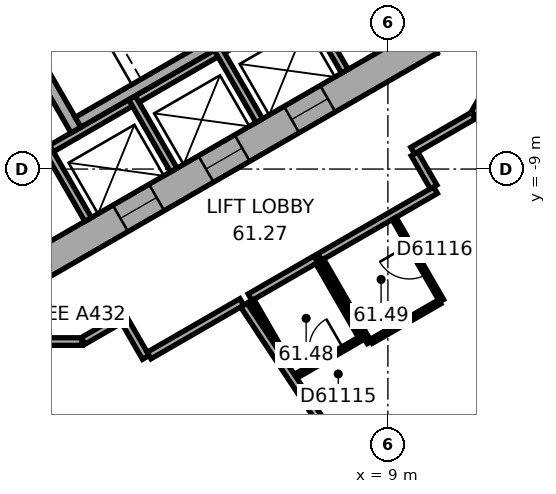
"""IFC4 building model, lengths in metres.
Left out: names, types, materials, properties, quantities, classifications, styles, units other than length and angle.
Written with IfcOpenShell. Run it as: python <this file> out.ifc"""

import sys

from ifc_helpers import new_model, si_unit, direction, frame, frame_2d, origin, place, context, subcontext, project, spatial, rectangle, extrude, element, fill, save


model = new_model("IFC4")
c1 = context("Model", 3, precision=1e-05, world=origin(), true_north=direction((0.0, 1.0)))
c2 = subcontext(c1, "Body", "Model", "MODEL_VIEW")
j1 = project(units=[si_unit("LENGTHUNIT", "METRE"), si_unit("PLANEANGLEUNIT", "RADIAN")], contexts=[c1])
p1 = place(None, origin())
s1 = spatial("IfcSite", under=j1, at=p1, CompositionType="ELEMENT")
p2 = place(p1, origin())
s2 = spatial("IfcBuilding", under=s1, at=p2, CompositionType="ELEMENT")
p3 = place(p2, frame((0.0, 0.0, 247.6)))
s3 = spatial("IfcBuildingStorey", under=s2, at=p3, CompositionType="ELEMENT", Elevation=247.6)
p4 = place(p3, frame((9.9, -5.947, 0.0), z_axis=(0.0, 0.0, 1.0), x_axis=(0.0, 1.0, 0.0)))
e1 = element("IfcWall", 1, at=p4, inside=s3, PredefinedType="SHEAR", context=c2, shape_type="SweptSolid", body=[
    extrude(rectangle(XDim=11.894, YDim=0.8, at=frame_2d((5.947, 0.0))), origin(), (0.0, 0.0, 1.0), 3.7),
])
p5 = place(p4, frame((6.147, 0.0, 0.0)))
e2 = element("IfcOpeningElement", 2, at=p5, cuts=e1, PredefinedType="OPENING", context=c2, shape_type="SweptSolid", body=[
    extrude(rectangle(XDim=1.5, YDim=2.1, at=frame_2d((0.75, 1.05))), frame((0.0, 0.41, 0.0), z_axis=(0.0, -1.0, 0.0), x_axis=(1.0, 0.0, 0.0)), (0.0, 0.0, 1.0), 0.82),
])
p6 = place(p4, frame((1.697, 0.0, 0.0)))
e3 = element("IfcOpeningElement", 3, at=p6, cuts=e1, PredefinedType="OPENING", context=c2, shape_type="SweptSolid", body=[
    extrude(rectangle(XDim=0.9, YDim=2.1, at=frame_2d((0.45, 1.05))), frame((0.0, 0.41, 0.0), z_axis=(0.0, -1.0, 0.0), x_axis=(1.0, 0.0, 0.0)), (0.0, 0.0, 1.0), 0.82),
])
p7 = place(p4, frame((4.297, 0.0, 0.0)))
e4 = element("IfcOpeningElement", 4, at=p7, cuts=e1, PredefinedType="OPENING", context=c2, shape_type="SweptSolid", body=[
    extrude(rectangle(XDim=0.9, YDim=2.1, at=frame_2d((0.45, 1.05))), frame((0.0, 0.41, 0.0), z_axis=(0.0, -1.0, 0.0), x_axis=(1.0, 0.0, 0.0)), (0.0, 0.0, 1.0), 0.82),
])
p8 = place(p3, frame((-10.1, -5.6, 0.0), z_axis=(0.0, 0.0, 1.0), x_axis=(0.866023897231, -0.500002609418, 0.0)))
e5 = element("IfcWall", 5, at=p8, inside=s3, PredefinedType="SHEAR", context=c2, shape_type="SweptSolid", body=[
    extrude(rectangle(XDim=11.894, YDim=0.8, at=frame_2d((5.947, 0.0))), origin(), (0.0, 0.0, 1.0), 3.7),
])
p9 = place(p8, frame((6.147, 0.0, 0.0)))
e6 = element("IfcOpeningElement", 6, at=p9, cuts=e5, PredefinedType="OPENING", context=c2, shape_type="SweptSolid", body=[
    extrude(rectangle(XDim=1.5, YDim=2.1, at=frame_2d((0.75, 1.05))), frame((0.0, 0.41, 0.0), z_axis=(0.0, -1.0, 0.0), x_axis=(1.0, 0.0, 0.0)), (0.0, 0.0, 1.0), 0.82),
])
p10 = place(p8, frame((1.597, 0.0, 0.0)))
e7 = element("IfcOpeningElement", 7, at=p10, cuts=e5, PredefinedType="OPENING", context=c2, shape_type="SweptSolid", body=[
    extrude(rectangle(XDim=1.1, YDim=2.1, at=frame_2d((0.55, 1.05))), frame((0.0, 0.41, 0.0), z_axis=(0.0, -1.0, 0.0), x_axis=(1.0, 0.0, 0.0)), (0.0, 0.0, 1.0), 0.82),
])
p11 = place(p8, frame((4.197, 0.0, 0.0)))
e8 = element("IfcOpeningElement", 8, at=p11, cuts=e5, PredefinedType="OPENING", context=c2, shape_type="SweptSolid", body=[
    extrude(rectangle(XDim=1.1, YDim=2.1, at=frame_2d((0.55, 1.05))), frame((0.0, 0.41, 0.0), z_axis=(0.0, -1.0, 0.0), x_axis=(1.0, 0.0, 0.0)), (0.0, 0.0, 1.0), 0.82),
])
p12 = place(p3, frame((-0.2, -11.547, 0.0), z_axis=(0.0, 0.0, 1.0), x_axis=(0.866023897231, 0.500002609418, 0.0)))
e9 = element("IfcWall", 9, at=p12, inside=s3, PredefinedType="SHEAR", context=c2, shape_type="SweptSolid", body=[
    extrude(rectangle(XDim=11.894, YDim=0.8, at=frame_2d((5.947, 0.0))), origin(), (0.0, 0.0, 1.0), 3.7),
])
p13 = place(p12, frame((2.497, 0.0, 0.0)))
e10 = element("IfcOpeningElement", 10, at=p13, cuts=e9, PredefinedType="OPENING", context=c2, shape_type="SweptSolid", body=[
    extrude(rectangle(XDim=1.1, YDim=2.1, at=frame_2d((0.55, 1.05))), frame((0.0, 0.41, 0.0), z_axis=(0.0, -1.0, 0.0), x_axis=(1.0, 0.0, 0.0)), (0.0, 0.0, 1.0), 0.82),
])
p14 = place(p12, frame((5.097, 0.0, 0.0)))
e11 = element("IfcOpeningElement", 11, at=p14, cuts=e9, PredefinedType="OPENING", context=c2, shape_type="SweptSolid", body=[
    extrude(rectangle(XDim=1.1, YDim=2.1, at=frame_2d((0.55, 1.05))), frame((0.0, 0.41, 0.0), z_axis=(0.0, -1.0, 0.0), x_axis=(1.0, 0.0, 0.0)), (0.0, 0.0, 1.0), 0.82),
])
p15 = place(p12, frame((7.697, 0.0, 0.0)))
e12 = element("IfcOpeningElement", 12, at=p15, cuts=e9, PredefinedType="OPENING", context=c2, shape_type="SweptSolid", body=[
    extrude(rectangle(XDim=1.1, YDim=2.1, at=frame_2d((0.55, 1.05))), frame((0.0, 0.41, 0.0), z_axis=(0.0, -1.0, 0.0), x_axis=(1.0, 0.0, 0.0)), (0.0, 0.0, 1.0), 0.82),
])
p16 = place(p3, frame((2.739, -22.711, 0.0), z_axis=(0.0, 0.0, 1.0), x_axis=(0.833885723098, 0.551937134838, 0.0)))
e13 = element("IfcWall", 13, at=p16, inside=s3, PredefinedType="STANDARD", context=c2, shape_type="SweptSolid", body=[
    extrude(rectangle(XDim=18.841, YDim=0.2, at=frame_2d((9.421, 0.0))), origin(), (0.0, 0.0, 1.0), 3.7),
])
p17 = place(p16, frame((1.252, 0.0, 0.9)))
e14 = element("IfcOpeningElement", 14, at=p17, cuts=e13, PredefinedType="OPENING", context=c2, shape_type="SweptSolid", body=[
    extrude(rectangle(XDim=2.2, YDim=2.0, at=frame_2d((1.1, 1.0))), frame((0.0, 0.11, 0.0), z_axis=(0.0, -1.0, 0.0), x_axis=(1.0, 0.0, 0.0)), (0.0, 0.0, 1.0), 0.22),
])
p18 = place(p16, frame((4.786, 0.0, 0.9)))
e15 = element("IfcOpeningElement", 15, at=p18, cuts=e13, PredefinedType="OPENING", context=c2, shape_type="SweptSolid", body=[
    extrude(rectangle(XDim=2.2, YDim=2.0, at=frame_2d((1.1, 1.0))), frame((0.0, 0.11, 0.0), z_axis=(0.0, -1.0, 0.0), x_axis=(1.0, 0.0, 0.0)), (0.0, 0.0, 1.0), 0.22),
])
p19 = place(p16, frame((8.32, 0.0, 0.9)))
e16 = element("IfcOpeningElement", 16, at=p19, cuts=e13, PredefinedType="OPENING", context=c2, shape_type="SweptSolid", body=[
    extrude(rectangle(XDim=2.2, YDim=2.0, at=frame_2d((1.1, 1.0))), frame((0.0, 0.11, 0.0), z_axis=(0.0, -1.0, 0.0), x_axis=(1.0, 0.0, 0.0)), (0.0, 0.0, 1.0), 0.22),
])
p20 = place(p16, frame((11.854, 0.0, 0.9)))
e17 = element("IfcOpeningElement", 17, at=p20, cuts=e13, PredefinedType="OPENING", context=c2, shape_type="SweptSolid", body=[
    extrude(rectangle(XDim=2.2, YDim=2.0, at=frame_2d((1.1, 1.0))), frame((0.0, 0.11, 0.0), z_axis=(0.0, -1.0, 0.0), x_axis=(1.0, 0.0, 0.0)), (0.0, 0.0, 1.0), 0.22),
])
p21 = place(p16, frame((15.387, 0.0, 0.9)))
e18 = element("IfcOpeningElement", 18, at=p21, cuts=e13, PredefinedType="OPENING", context=c2, shape_type="SweptSolid", body=[
    extrude(rectangle(XDim=2.2, YDim=2.0, at=frame_2d((1.1, 1.0))), frame((0.0, 0.11, 0.0), z_axis=(0.0, -1.0, 0.0), x_axis=(1.0, 0.0, 0.0)), (0.0, 0.0, 1.0), 0.22),
])
p22 = place(p3, frame((-0.024, -8.559, 0.0), z_axis=(0.0, 0.0, 1.0), x_axis=(0.866026010844, 0.49999894854, 0.0)))
e19 = element("IfcWall", 19, at=p22, inside=s3, PredefinedType="PARTITIONING", context=c2, shape_type="SweptSolid", body=[
    extrude(rectangle(XDim=8.0, YDim=0.2, at=frame_2d((4.0, 0.0))), origin(), (0.0, 0.0, 1.0), 3.42),
])
for number, where, z_axis, x_axis in (
    (20, (0.013, -8.422, 0.0), (0.0, 0.0, 1.0), (0.5, -0.866, 0.0)),
    (21, (2.264, -7.122, 0.0), (0.0, 0.0, 1.0), (0.5, -0.866, 0.0)),
    (22, (4.516, -5.822, 0.0), (0.0, 0.0, 1.0), (0.5, -0.866, 0.0)),
    (23, (6.768, -4.522, 0.0), (0.0, 0.0, 1.0), (0.5, -0.866, 0.0)),
):
    element("IfcWall", number, at=place(p3, frame(where, z_axis=z_axis, x_axis=x_axis)), inside=s3, PredefinedType="PARTITIONING", context=c2, shape_type="SweptSolid", body=[
        extrude(rectangle(XDim=2.2, YDim=0.2, at=frame_2d((1.1, 0.0))), origin(), (0.0, 0.0, 1.0), 3.42),
    ])
p23 = place(p3, frame((-1.558, -3.902, 0.0), z_axis=(0.0, 0.0, 1.0), x_axis=(0.499977259774, -0.866038532462, 0.0)))
e24 = element("IfcWall", 24, at=p23, inside=s3, PredefinedType="SHEAR", context=c2, shape_type="SweptSolid", body=[
    extrude(rectangle(XDim=4.7, YDim=0.3, at=frame_2d((2.35, 0.0))), origin(), (0.0, 0.0, 1.0), 3.42),
])
p24 = place(p23, frame((0.8, 0.0, 0.0)))
e25 = element("IfcOpeningElement", 25, at=p24, cuts=e24, PredefinedType="OPENING", context=c2, shape_type="SweptSolid", body=[
    extrude(rectangle(XDim=1.2, YDim=2.1, at=frame_2d((0.6, 1.05))), frame((0.0, 0.16, 0.0), z_axis=(0.0, -1.0, 0.0), x_axis=(1.0, 0.0, 0.0)), (0.0, 0.0, 1.0), 0.32),
])
p25 = place(p3, frame((0.847, -7.767, 0.0), z_axis=(0.0, 0.0, 1.0), x_axis=(0.866027801685, 0.499995846692, 0.0)))
e26 = element("IfcWall", 26, at=p25, inside=s3, PredefinedType="SHEAR", context=c2, shape_type="SweptSolid", body=[
    extrude(rectangle(XDim=7.06, YDim=0.3, at=frame_2d((3.53, 0.0))), origin(), (0.0, 0.0, 1.0), 3.42),
])
p26 = place(p3, frame((-0.91, -13.539, 0.0), z_axis=(0.0, 0.0, 1.0), x_axis=(1.0, 0.0, 0.0)))
e27 = element("IfcWall", 27, at=p26, inside=s3, PredefinedType="PARTITIONING", context=c2, shape_type="SweptSolid", body=[
    extrude(rectangle(XDim=1.86, YDim=0.2, at=frame_2d((0.93, 0.0))), origin(), (0.0, 0.0, 1.0), 3.42),
])
p27 = place(p3, frame((0.985, -13.519, 0.0), z_axis=(0.0, 0.0, 1.0), x_axis=(0.866054082991, 0.499950322867, 0.0)))
e28 = element("IfcWall", 28, at=p27, inside=s3, PredefinedType="PARTITIONING", context=c2, shape_type="SweptSolid", body=[
    extrude(rectangle(XDim=1.206, YDim=0.2, at=frame_2d((0.603, 0.0))), origin(), (0.0, 0.0, 1.0), 3.42),
])
p28 = place(p3, frame((2.079, -13.003, 0.0), z_axis=(0.0, 0.0, 1.0), x_axis=(0.500074377092, -0.865982457891, 0.0)))
e29 = element("IfcWall", 29, at=p28, inside=s3, PredefinedType="PARTITIONING", context=c2, shape_type="SweptSolid", body=[
    extrude(rectangle(XDim=1.101, YDim=0.2, at=frame_2d((0.55, 0.0))), origin(), (0.0, 0.0, 1.0), 3.42),
])
p29 = place(p3, frame((2.716, -13.906, 0.0), z_axis=(0.0, 0.0, 1.0), x_axis=(0.866048512801, 0.499959971872, 0.0)))
e30 = element("IfcWall", 30, at=p29, inside=s3, PredefinedType="PARTITIONING", context=c2, shape_type="SweptSolid", body=[
    extrude(rectangle(XDim=2.818, YDim=0.2, at=frame_2d((1.409, 0.0))), origin(), (0.0, 0.0, 1.0), 3.42),
])
p30 = place(p3, frame((5.373, -12.372, 0.0), z_axis=(0.0, 0.0, 1.0), x_axis=(0.866010750942, 0.50002537861, 0.0)))
e31 = element("IfcWall", 31, at=p30, inside=s3, PredefinedType="PARTITIONING", context=c2, shape_type="SweptSolid", body=[
    extrude(rectangle(XDim=2.0, YDim=0.2, at=frame_2d((1.0, 0.0))), origin(), (0.0, 0.0, 1.0), 3.42),
])
p31 = place(p3, frame((6.107, -13.644, 0.0), z_axis=(0.0, 0.0, 1.0), x_axis=(-0.500072492706, 0.865983546056, 0.0)))
e32 = element("IfcWall", 32, at=p31, inside=s3, PredefinedType="PARTITIONING", context=c2, shape_type="SweptSolid", body=[
    extrude(rectangle(XDim=1.368, YDim=0.12, at=frame_2d((0.684, 0.0))), origin(), (0.0, 0.0, 1.0), 3.42),
])
p32 = place(p3, frame((7.155, -11.459, 0.0), z_axis=(0.0, 0.0, 1.0), x_axis=(0.500077740698, -0.865980515519, 0.0)))
e33 = element("IfcWall", 33, at=p32, inside=s3, PredefinedType="PARTITIONING", context=c2, shape_type="SweptSolid", body=[
    extrude(rectangle(XDim=2.3, YDim=0.12, at=frame_2d((1.15, 0.0))), origin(), (0.0, 0.0, 1.0), 3.42),
])
p33 = place(p3, frame((7.208, -11.312, 0.0), z_axis=(0.0, 0.0, 1.0), x_axis=(0.866050243185, 0.499956974429, 0.0)))
e34 = element("IfcWall", 34, at=p33, inside=s3, PredefinedType="PARTITIONING", context=c2, shape_type="SweptSolid", body=[
    extrude(rectangle(XDim=3.514, YDim=0.2, at=frame_2d((1.757, 0.0))), origin(), (0.0, 0.0, 1.0), 3.42),
])
p34 = place(p3, frame((8.253, -13.481, 0.0), z_axis=(0.0, 0.0, 1.0), x_axis=(-0.866045024864, -0.499966013754, 0.0)))
e35 = element("IfcWall", 35, at=p34, inside=s3, PredefinedType="PARTITIONING", context=c2, shape_type="SweptSolid", body=[
    extrude(rectangle(XDim=1.88, YDim=0.12, at=frame_2d((0.94, 0.0))), origin(), (0.0, 0.0, 1.0), 3.42),
])
p35 = place(p34, frame((0.49, 0.0, 0.0)))
e36 = element("IfcOpeningElement", 36, at=p35, cuts=e35, PredefinedType="OPENING", context=c2, shape_type="SweptSolid", body=[
    extrude(rectangle(XDim=0.9, YDim=2.1, at=frame_2d((0.45, 1.05))), frame((0.0, 0.07, 0.0), z_axis=(0.0, -1.0, 0.0), x_axis=(1.0, 0.0, 0.0)), (0.0, 0.0, 1.0), 0.14),
])
p36 = place(p3, frame((8.509, -13.564, 0.0), z_axis=(0.0, 0.0, 1.0), x_axis=(-0.500004234368, 0.866022959057, 0.0)))
e37 = element("IfcWall", 37, at=p36, inside=s3, PredefinedType="PARTITIONING", context=c2, shape_type="SweptSolid", body=[
    extrude(rectangle(XDim=2.5, YDim=0.12, at=frame_2d((1.25, 0.0))), origin(), (0.0, 0.0, 1.0), 3.42),
])
p37 = place(p3, frame((8.624, -17.737, 0.0), z_axis=(0.0, 0.0, 1.0), x_axis=(-0.551945242328, 0.833880356809, 0.0)))
e38 = element("IfcWall", 38, at=p37, inside=s3, PredefinedType="PARTITIONING", context=c2, shape_type="SweptSolid", body=[
    extrude(rectangle(XDim=6.183, YDim=0.2, at=frame_2d((3.091, 0.0))), origin(), (0.0, 0.0, 1.0), 2.87),
])
p38 = place(p3, frame((9.164, -10.299, 0.0), z_axis=(0.0, 0.0, 1.0), x_axis=(0.500004234368, -0.866022959057, 0.0)))
e39 = element("IfcWall", 39, at=p38, inside=s3, PredefinedType="PARTITIONING", context=c2, shape_type="SweptSolid", body=[
    extrude(rectangle(XDim=2.5, YDim=0.12, at=frame_2d((1.25, 0.0))), origin(), (0.0, 0.0, 1.0), 3.42),
])
p39 = place(p38, frame((0.8, 0.0, 0.0)))
e40 = element("IfcOpeningElement", 40, at=p39, cuts=e39, PredefinedType="OPENING", context=c2, shape_type="SweptSolid", body=[
    extrude(rectangle(XDim=0.9, YDim=2.1, at=frame_2d((0.45, 1.05))), frame((0.0, 0.07, 0.0), z_axis=(0.0, -1.0, 0.0), x_axis=(1.0, 0.0, 0.0)), (0.0, 0.0, 1.0), 0.14),
])
p40 = place(p3, frame((9.652, -8.515, 0.0), z_axis=(0.0, 0.0, 1.0), x_axis=(0.866020375458, 0.500008709215, 0.0)))
e41 = element("IfcWall", 41, at=p40, inside=s3, PredefinedType="PARTITIONING", context=c2, shape_type="SweptSolid", body=[
    extrude(rectangle(XDim=1.846, YDim=0.2, at=frame_2d((0.923, 0.0))), origin(), (0.0, 0.0, 1.0), 3.42),
])
p41 = place(p3, frame((10.202, -9.469, 0.0), z_axis=(0.0, 0.0, 1.0), x_axis=(-0.499968756647, 0.866043441391, 0.0)))
e42 = element("IfcWall", 42, at=p41, inside=s3, PredefinedType="PARTITIONING", context=c2, shape_type="SweptSolid", body=[
    extrude(rectangle(XDim=1.001, YDim=0.2, at=frame_2d((0.5, 0.0))), origin(), (0.0, 0.0, 1.0), 3.42),
])
p42 = place(p3, frame((10.362, -12.494, 0.0), z_axis=(0.0, 0.0, 1.0), x_axis=(-0.866009661879, -0.500027264788, 0.0)))
e43 = element("IfcWall", 43, at=p42, inside=s3, PredefinedType="PARTITIONING", context=c2, shape_type="SweptSolid", body=[
    extrude(rectangle(XDim=2.08, YDim=0.12, at=frame_2d((1.04, 0.0))), origin(), (0.0, 0.0, 1.0), 3.42),
])
p43 = place(p3, frame((11.27, -7.558, 0.0), z_axis=(0.0, 0.0, 1.0), x_axis=(0.499964847546, 0.866045698112, 0.0)))
e44 = element("IfcWall", 44, at=p43, inside=s3, PredefinedType="PARTITIONING", context=c2, shape_type="SweptSolid", body=[
    extrude(rectangle(XDim=1.86, YDim=0.2, at=frame_2d((0.93, 0.0))), origin(), (0.0, 0.0, 1.0), 3.42),
])
p44 = place(p13, origin())
e45 = element("IfcDoor", 45, at=p44, inside=s3, OperationType="DOUBLE_DOOR_SLIDING", PredefinedType="DOOR", context=c2, shape_type="SweptSolid", body=[
    extrude(rectangle(XDim=1.1, YDim=2.1, at=frame_2d((0.55, 1.05))), frame((0.0, 0.025, 0.0), z_axis=(0.0, -1.0, 0.0), x_axis=(1.0, 0.0, 0.0)), (0.0, 0.0, 1.0), 0.05),
])
fill(e10, e45)
p45 = place(p14, origin())
e46 = element("IfcDoor", 46, at=p45, inside=s3, OperationType="DOUBLE_DOOR_SLIDING", PredefinedType="DOOR", context=c2, shape_type="SweptSolid", body=[
    extrude(rectangle(XDim=1.1, YDim=2.1, at=frame_2d((0.55, 1.05))), frame((0.0, 0.025, 0.0), z_axis=(0.0, -1.0, 0.0), x_axis=(1.0, 0.0, 0.0)), (0.0, 0.0, 1.0), 0.05),
])
fill(e11, e46)
p46 = place(p15, origin())
e47 = element("IfcDoor", 47, at=p46, inside=s3, OperationType="DOUBLE_DOOR_SLIDING", PredefinedType="DOOR", context=c2, shape_type="SweptSolid", body=[
    extrude(rectangle(XDim=1.1, YDim=2.1, at=frame_2d((0.55, 1.05))), frame((0.0, 0.025, 0.0), z_axis=(0.0, -1.0, 0.0), x_axis=(1.0, 0.0, 0.0)), (0.0, 0.0, 1.0), 0.05),
])
fill(e12, e47)
p47 = place(p35, origin())
e48 = element("IfcDoor", 48, at=p47, inside=s3, OperationType="SINGLE_SWING_LEFT", PredefinedType="DOOR", context=c2, shape_type="SweptSolid", body=[
    extrude(rectangle(XDim=0.9, YDim=2.1, at=frame_2d((0.45, 1.05))), frame((0.0, 0.025, 0.0), z_axis=(0.0, -1.0, 0.0), x_axis=(1.0, 0.0, 0.0)), (0.0, 0.0, 1.0), 0.05),
])
fill(e36, e48)
p48 = place(p39, origin())
e49 = element("IfcDoor", 49, at=p48, inside=s3, OperationType="SINGLE_SWING_LEFT", PredefinedType="DOOR", context=c2, shape_type="SweptSolid", body=[
    extrude(rectangle(XDim=0.9, YDim=2.1, at=frame_2d((0.45, 1.05))), frame((0.0, 0.025, 0.0), z_axis=(0.0, -1.0, 0.0), x_axis=(1.0, 0.0, 0.0)), (0.0, 0.0, 1.0), 0.05),
])
fill(e40, e49)
save(model, sys.argv[1])
